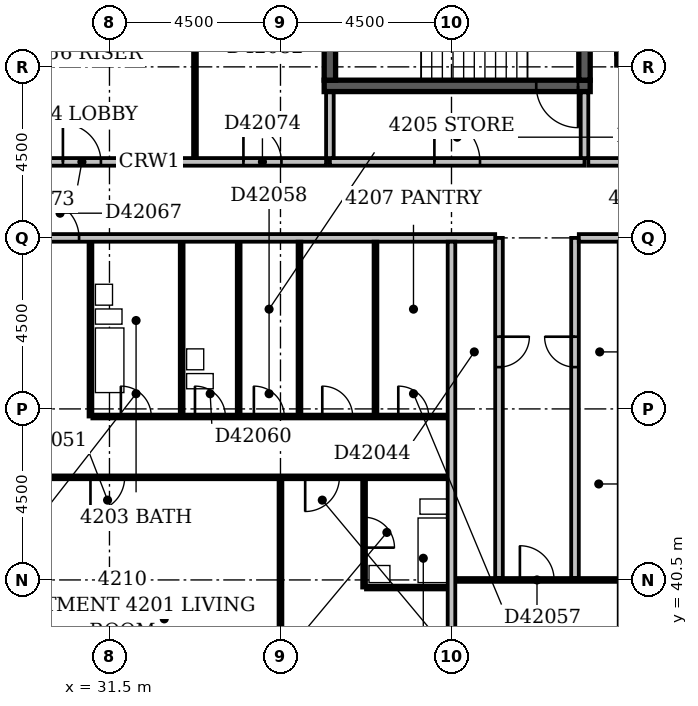
"""IFC4 building model, lengths in metres.
Left out: names, types, materials, properties, quantities, classifications, styles, units other than length and angle.
Written with IfcOpenShell. Run it as: python <this file> out.ifc"""

import sys

from ifc_helpers import new_model, si_unit, direction, frame, frame_2d, origin, place, context, subcontext, project, spatial, rectangle, extrude, element, fill, save


model = new_model("IFC4")
c1 = context("Model", 3, precision=1e-05, world=origin(), true_north=direction((0.0, 1.0)))
c2 = subcontext(c1, "Body", "Model", "MODEL_VIEW")
j1 = project(units=[si_unit("LENGTHUNIT", "METRE"), si_unit("PLANEANGLEUNIT", "RADIAN")], contexts=[c1])
p1 = place(None, origin())
s1 = spatial("IfcSite", under=j1, at=p1, CompositionType="ELEMENT")
p2 = place(p1, origin())
s2 = spatial("IfcBuilding", under=s1, at=p2, CompositionType="ELEMENT")
p3 = place(p2, frame((0.0, 0.0, 166.4)))
s3 = spatial("IfcBuildingStorey", under=s2, at=p3, CompositionType="ELEMENT", Elevation=166.4)
p4 = place(p3, frame((37.15, 53.5, -0.3), z_axis=(0.0, 0.0, 1.0), x_axis=(1.0, 0.0, 0.0)))
e1 = element("IfcWall", 1, at=p4, inside=s3, PredefinedType="SHEAR", context=c2, shape_type="SweptSolid", body=[
    extrude(rectangle(XDim=7.0, YDim=0.3, at=frame_2d((3.5, 0.0))), origin(), (0.0, 0.0, 1.0), 3.6),
])
p5 = place(p4, frame((5.58, 0.0, 0.3)))
e2 = element("IfcOpeningElement", 2, at=p5, cuts=e1, PredefinedType="OPENING", context=c2, shape_type="SweptSolid", body=[
    extrude(rectangle(XDim=1.1, YDim=2.1, at=frame_2d((0.55, 1.05))), frame((0.0, 0.162, 0.0), z_axis=(0.0, -1.0, 0.0), x_axis=(1.0, 0.0, 0.0)), (0.0, 0.0, 1.0), 0.324),
])
for number, where, z_axis, x_axis in (
    (3, (37.3, 53.65, -0.3), (0.0, 0.0, 1.0), (0.0, 1.0, 0.0)),
    (4, (44.0, 53.65, -0.3), (0.0, 0.0, 1.0), (0.0, 1.0, 0.0)),
):
    element("IfcWall", number, at=place(p3, frame(where, z_axis=z_axis, x_axis=x_axis)), inside=s3, PredefinedType="SHEAR", context=c2, shape_type="SweptSolid", body=[
        extrude(rectangle(XDim=4.2, YDim=0.3, at=frame_2d((2.1, 0.0))), origin(), (0.0, 0.0, 1.0), 3.6),
    ])
p6 = place(p3, frame((44.85, 54.2, -0.3), z_axis=(0.0, 0.0, 1.0), x_axis=(1.0, 0.0, 0.0)))
e5 = element("IfcWall", 5, at=p6, inside=s3, PredefinedType="SHEAR", context=c2, shape_type="SweptSolid", body=[
    extrude(rectangle(XDim=2.3, YDim=0.3, at=frame_2d((1.15, 0.0))), origin(), (0.0, 0.0, 1.0), 3.6),
])
p7 = place(p6, frame((0.65, 0.0, 0.3)))
e6 = element("IfcOpeningElement", 6, at=p7, cuts=e5, PredefinedType="OPENING", context=c2, shape_type="SweptSolid", body=[
    extrude(rectangle(XDim=1.0, YDim=2.1, at=frame_2d((0.5, 1.05))), frame((0.0, 0.162, 0.0), z_axis=(0.0, -1.0, 0.0), x_axis=(1.0, 0.0, 0.0)), (0.0, 0.0, 1.0), 0.324),
])
p8 = place(p3, frame((45.0, 54.35, -0.3), z_axis=(0.0, 0.0, 1.0), x_axis=(0.0, 1.0, 0.0)))
e7 = element("IfcWall", 7, at=p8, inside=s3, PredefinedType="SHEAR", context=c2, shape_type="SweptSolid", body=[
    extrude(rectangle(XDim=3.5, YDim=0.3, at=frame_2d((1.75, 0.0))), origin(), (0.0, 0.0, 1.0), 3.6),
])
p9 = place(p3, frame((37.3, 51.5, 0.0), z_axis=(0.0, 0.0, 1.0), x_axis=(1.0, 0.0, 0.0)))
e8 = element("IfcWall", 8, at=p9, inside=s3, PredefinedType="PARTITIONING", context=c2, shape_type="SweptSolid", body=[
    extrude(rectangle(XDim=6.7, YDim=0.2, at=frame_2d((3.35, 0.0))), origin(), (0.0, 0.0, 1.0), 3.3),
])
p10 = place(p9, frame((2.75, 0.0, 0.0)))
e9 = element("IfcOpeningElement", 9, at=p10, cuts=e8, PredefinedType="OPENING", context=c2, shape_type="SweptSolid", body=[
    extrude(rectangle(XDim=1.2, YDim=2.1, at=frame_2d((0.6, 1.05))), frame((0.0, 0.112, 0.0), z_axis=(0.0, -1.0, 0.0), x_axis=(1.0, 0.0, 0.0)), (0.0, 0.0, 1.0), 0.224),
])
for number, where, z_axis, x_axis in (
    (10, (44.0, 51.6, 0.0), (0.0, 0.0, 1.0), (0.0, 1.0, 0.0)),
    (11, (37.3, 51.6, 0.0), (0.0, 0.0, 1.0), (0.0, 1.0, 0.0)),
):
    element("IfcWall", number, at=place(p3, frame(where, z_axis=z_axis, x_axis=x_axis)), inside=s3, PredefinedType="PARTITIONING", context=c2, shape_type="SweptSolid", body=[
        extrude(rectangle(XDim=1.73, YDim=0.2, at=frame_2d((0.865, 0.0))), origin(), (0.0, 0.0, 1.0), 3.3),
    ])
p11 = place(p3, frame((36.0, 36.5, 0.0), z_axis=(0.0, 0.0, 1.0), x_axis=(0.0, 1.0, 0.0)))
e12 = element("IfcWall", 12, at=p11, inside=s3, PredefinedType="PARTITIONING", context=c2, shape_type="SweptSolid", body=[
    extrude(rectangle(XDim=6.65, YDim=0.1, at=frame_2d((3.325, 0.0))), origin(), (0.0, 0.0, 1.0), 2.4),
])
p12 = place(p3, frame((40.5, 36.5, 0.0), z_axis=(0.0, 0.0, 1.0), x_axis=(0.0, 1.0, 0.0)))
e13 = element("IfcWall", 13, at=p12, inside=s3, PredefinedType="PARTITIONING", context=c2, shape_type="SweptSolid", body=[
    extrude(rectangle(XDim=12.9, YDim=0.2, at=frame_2d((6.45, 0.0))), origin(), (0.0, 0.0, 1.0), 3.3),
])
p13 = place(p3, frame((38.2, 40.3, 0.0), z_axis=(0.0, 0.0, 1.0), x_axis=(0.0, 1.0, 0.0)))
e14 = element("IfcWall", 14, at=p13, inside=s3, PredefinedType="PLUMBINGWALL", context=c2, shape_type="SweptSolid", body=[
    extrude(rectangle(XDim=2.85, YDim=0.1, at=frame_2d((1.425, 0.0))), origin(), (0.0, 0.0, 1.0), 3.3),
])
p14 = place(p13, frame((1.05, 0.0, 0.0)))
e15 = element("IfcOpeningElement", 15, at=p14, cuts=e14, PredefinedType="OPENING", context=c2, shape_type="SweptSolid", body=[
    extrude(rectangle(XDim=0.8, YDim=2.1, at=frame_2d((0.4, 1.05))), frame((0.0, 0.062, 0.0), z_axis=(0.0, -1.0, 0.0), x_axis=(1.0, 0.0, 0.0)), (0.0, 0.0, 1.0), 0.124),
])
p15 = place(p3, frame((38.25, 40.3, 0.0), z_axis=(0.0, 0.0, 1.0), x_axis=(1.0, 0.0, 0.0)))
e16 = element("IfcWall", 16, at=p15, inside=s3, PredefinedType="PLUMBINGWALL", context=c2, shape_type="SweptSolid", body=[
    extrude(rectangle(XDim=2.15, YDim=0.1, at=frame_2d((1.075, 0.0))), origin(), (0.0, 0.0, 1.0), 3.3),
])
p16 = place(p3, frame((40.6, 40.5, 0.0), z_axis=(0.0, 0.0, 1.0), x_axis=(1.0, 0.0, 0.0)))
e17 = element("IfcWall", 17, at=p16, inside=s3, PredefinedType="PARTITIONING", context=c2, shape_type="SweptSolid", body=[
    extrude(rectangle(XDim=4.3, YDim=0.1, at=frame_2d((2.15, 0.0))), origin(), (0.0, 0.0, 1.0), 3.3),
])
p17 = place(p16, frame((1.7, 0.0, 0.0)))
e18 = element("IfcOpeningElement", 18, at=p17, cuts=e17, PredefinedType="OPENING", context=c2, shape_type="SweptSolid", body=[
    extrude(rectangle(XDim=0.9, YDim=2.1, at=frame_2d((0.45, 1.05))), frame((0.0, 0.062, 0.0), z_axis=(0.0, -1.0, 0.0), x_axis=(1.0, 0.0, 0.0)), (0.0, 0.0, 1.0), 0.124),
])
p18 = place(p3, frame((41.75, 40.55, 0.0), z_axis=(0.0, 0.0, 1.0), x_axis=(0.0, 1.0, 0.0)))
e19 = element("IfcWall", 19, at=p18, inside=s3, PredefinedType="PARTITIONING", context=c2, shape_type="SweptSolid", body=[
    extrude(rectangle(XDim=8.95, YDim=0.2, at=frame_2d((4.475, 0.0))), origin(), (0.0, 0.0, 1.0), 3.3),
])
p19 = place(p18, frame((5.55, 0.0, 0.0)))
e20 = element("IfcOpeningElement", 20, at=p19, cuts=e19, PredefinedType="OPENING", context=c2, shape_type="SweptSolid", body=[
    extrude(rectangle(XDim=0.8, YDim=2.1, at=frame_2d((0.4, 1.05))), frame((0.0, 0.112, 0.0), z_axis=(0.0, -1.0, 0.0), x_axis=(1.0, 0.0, 0.0)), (0.0, 0.0, 1.0), 0.224),
])
p20 = place(p3, frame((43.75, 40.55, 0.0), z_axis=(0.0, 0.0, 1.0), x_axis=(0.0, 1.0, 0.0)))
e21 = element("IfcWall", 21, at=p20, inside=s3, PredefinedType="PARTITIONING", context=c2, shape_type="SweptSolid", body=[
    extrude(rectangle(XDim=8.95, YDim=0.2, at=frame_2d((4.475, 0.0))), origin(), (0.0, 0.0, 1.0), 3.3),
])
p21 = place(p20, frame((5.55, 0.0, 0.0)))
e22 = element("IfcOpeningElement", 22, at=p21, cuts=e21, PredefinedType="OPENING", context=c2, shape_type="SweptSolid", body=[
    extrude(rectangle(XDim=0.8, YDim=2.1, at=frame_2d((0.4, 1.05))), frame((0.0, 0.112, 0.0), z_axis=(0.0, -1.0, 0.0), x_axis=(1.0, 0.0, 0.0)), (0.0, 0.0, 1.0), 0.224),
])
p22 = place(p3, frame((22.6, 43.2, 0.0), z_axis=(0.0, 0.0, 1.0), x_axis=(1.0, 0.0, 0.0)))
e23 = element("IfcWall", 23, at=p22, inside=s3, PredefinedType="PARTITIONING", context=c2, shape_type="SweptSolid", body=[
    extrude(rectangle(XDim=17.8, YDim=0.1, at=frame_2d((8.9, 0.0))), origin(), (0.0, 0.0, 1.0), 3.3),
])
p23 = place(p22, frame((2.85, 0.0, 0.0)))
e24 = element("IfcOpeningElement", 24, at=p23, cuts=e23, PredefinedType="OPENING", context=c2, shape_type="SweptSolid", body=[
    extrude(rectangle(XDim=0.9, YDim=2.1, at=frame_2d((0.45, 1.05))), frame((0.0, 0.062, 0.0), z_axis=(0.0, -1.0, 0.0), x_axis=(1.0, 0.0, 0.0)), (0.0, 0.0, 1.0), 0.124),
])
p24 = place(p22, frame((8.4, 0.0, 0.0)))
e25 = element("IfcOpeningElement", 25, at=p24, cuts=e23, PredefinedType="OPENING", context=c2, shape_type="SweptSolid", body=[
    extrude(rectangle(XDim=0.9, YDim=2.1, at=frame_2d((0.45, 1.05))), frame((0.0, 0.062, 0.0), z_axis=(0.0, -1.0, 0.0), x_axis=(1.0, 0.0, 0.0)), (0.0, 0.0, 1.0), 0.124),
])
p25 = place(p22, frame((14.05, 0.0, 0.0)))
e26 = element("IfcOpeningElement", 26, at=p25, cuts=e23, PredefinedType="OPENING", context=c2, shape_type="SweptSolid", body=[
    extrude(rectangle(XDim=0.9, YDim=2.1, at=frame_2d((0.45, 1.05))), frame((0.0, 0.062, 0.0), z_axis=(0.0, -1.0, 0.0), x_axis=(1.0, 0.0, 0.0)), (0.0, 0.0, 1.0), 0.124),
])
p26 = place(p3, frame((31.0, 44.8, 0.0), z_axis=(0.0, 0.0, 1.0), x_axis=(0.0, 1.0, 0.0)))
e27 = element("IfcWall", 27, at=p26, inside=s3, PredefinedType="PLUMBINGWALL", context=c2, shape_type="SweptSolid", body=[
    extrude(rectangle(XDim=4.6, YDim=0.1, at=frame_2d((2.3, 0.0))), origin(), (0.0, 0.0, 1.0), 3.3),
])
p27 = place(p3, frame((31.05, 44.8, 0.0), z_axis=(0.0, 0.0, 1.0), x_axis=(1.0, 0.0, 0.0)))
e28 = element("IfcWall", 28, at=p27, inside=s3, PredefinedType="PARTITIONING", context=c2, shape_type="SweptSolid", body=[
    extrude(rectangle(XDim=9.35, YDim=0.1, at=frame_2d((4.675, 0.0))), origin(), (0.0, 0.0, 1.0), 3.3),
])
p28 = place(p27, frame((0.75, 0.0, 0.0)))
e29 = element("IfcOpeningElement", 29, at=p28, cuts=e28, PredefinedType="OPENING", context=c2, shape_type="SweptSolid", body=[
    extrude(rectangle(XDim=0.8, YDim=2.1, at=frame_2d((0.4, 1.05))), frame((0.0, 0.062, 0.0), z_axis=(0.0, -1.0, 0.0), x_axis=(1.0, 0.0, 0.0)), (0.0, 0.0, 1.0), 0.124),
])
p29 = place(p27, frame((8.05, 0.0, 0.0)))
e30 = element("IfcOpeningElement", 30, at=p29, cuts=e28, PredefinedType="OPENING", context=c2, shape_type="SweptSolid", body=[
    extrude(rectangle(XDim=0.8, YDim=2.1, at=frame_2d((0.4, 1.05))), frame((0.0, 0.062, 0.0), z_axis=(0.0, -1.0, 0.0), x_axis=(1.0, 0.0, 0.0)), (0.0, 0.0, 1.0), 0.124),
])
p30 = place(p27, frame((4.25, 0.0, 0.0)))
e31 = element("IfcOpeningElement", 31, at=p30, cuts=e28, PredefinedType="OPENING", context=c2, shape_type="SweptSolid", body=[
    extrude(rectangle(XDim=0.8, YDim=2.1, at=frame_2d((0.4, 1.05))), frame((0.0, 0.062, 0.0), z_axis=(0.0, -1.0, 0.0), x_axis=(1.0, 0.0, 0.0)), (0.0, 0.0, 1.0), 0.124),
])
p31 = place(p27, frame((6.05, 0.0, 0.0)))
e32 = element("IfcOpeningElement", 32, at=p31, cuts=e28, PredefinedType="OPENING", context=c2, shape_type="SweptSolid", body=[
    extrude(rectangle(XDim=0.8, YDim=2.1, at=frame_2d((0.4, 1.05))), frame((0.0, 0.062, 0.0), z_axis=(0.0, -1.0, 0.0), x_axis=(1.0, 0.0, 0.0)), (0.0, 0.0, 1.0), 0.124),
])
p32 = place(p27, frame((2.7, 0.0, 0.0)))
e33 = element("IfcOpeningElement", 33, at=p32, cuts=e28, PredefinedType="OPENING", context=c2, shape_type="SweptSolid", body=[
    extrude(rectangle(XDim=0.8, YDim=2.1, at=frame_2d((0.4, 1.05))), frame((0.0, 0.062, 0.0), z_axis=(0.0, -1.0, 0.0), x_axis=(1.0, 0.0, 0.0)), (0.0, 0.0, 1.0), 0.124),
])
for number, where, z_axis, x_axis in (
    (34, (33.4, 44.85, 0.0), (0.0, 0.0, 1.0), (0.0, 1.0, 0.0)),
    (35, (34.9, 44.85, 0.0), (0.0, 0.0, 1.0), (0.0, 1.0, 0.0)),
):
    element("IfcWall", number, at=place(p3, frame(where, z_axis=z_axis, x_axis=x_axis)), inside=s3, PredefinedType="PLUMBINGWALL", context=c2, shape_type="SweptSolid", body=[
        extrude(rectangle(XDim=4.55, YDim=0.1, at=frame_2d((2.275, 0.0))), origin(), (0.0, 0.0, 1.0), 3.3),
    ])
p33 = place(p3, frame((36.5, 44.85, 0.0), z_axis=(0.0, 0.0, 1.0), x_axis=(0.0, 1.0, 0.0)))
e36 = element("IfcWall", 36, at=p33, inside=s3, PredefinedType="PARTITIONING", context=c2, shape_type="SweptSolid", body=[
    extrude(rectangle(XDim=4.55, YDim=0.1, at=frame_2d((2.275, 0.0))), origin(), (0.0, 0.0, 1.0), 2.4),
])
p34 = place(p3, frame((38.5, 44.85, 0.0), z_axis=(0.0, 0.0, 1.0), x_axis=(0.0, 1.0, 0.0)))
e37 = element("IfcWall", 37, at=p34, inside=s3, PredefinedType="PARTITIONING", context=c2, shape_type="SweptSolid", body=[
    extrude(rectangle(XDim=4.55, YDim=0.1, at=frame_2d((2.275, 0.0))), origin(), (0.0, 0.0, 1.0), 3.3),
])
p35 = place(p3, frame((9.1, 49.5, 0.0), z_axis=(0.0, 0.0, 1.0), x_axis=(1.0, 0.0, 0.0)))
e38 = element("IfcWall", 38, at=p35, inside=s3, PredefinedType="PARTITIONING", context=c2, shape_type="SweptSolid", body=[
    extrude(rectangle(XDim=32.55, YDim=0.2, at=frame_2d((16.275, 0.0))), origin(), (0.0, 0.0, 1.0), 3.3),
])
p36 = place(p35, frame((20.6, 0.0, 0.0)))
e39 = element("IfcOpeningElement", 39, at=p36, cuts=e38, PredefinedType="OPENING", context=c2, shape_type="SweptSolid", body=[
    extrude(rectangle(XDim=1.0, YDim=2.1, at=frame_2d((0.5, 1.05))), frame((0.0, 0.112, 0.0), z_axis=(0.0, -1.0, 0.0), x_axis=(1.0, 0.0, 0.0)), (0.0, 0.0, 1.0), 0.224),
])
p37 = place(p35, frame((6.15, 0.0, 0.0)))
e40 = element("IfcOpeningElement", 40, at=p37, cuts=e38, PredefinedType="OPENING", context=c2, shape_type="SweptSolid", body=[
    extrude(rectangle(XDim=0.9, YDim=2.1, at=frame_2d((0.45, 1.05))), frame((0.0, 0.112, 0.0), z_axis=(0.0, -1.0, 0.0), x_axis=(1.0, 0.0, 0.0)), (0.0, 0.0, 1.0), 0.224),
])
p38 = place(p3, frame((43.85, 49.5, 0.0), z_axis=(0.0, 0.0, 1.0), x_axis=(1.0, 0.0, 0.0)))
e41 = element("IfcWall", 41, at=p38, inside=s3, PredefinedType="PARTITIONING", context=c2, shape_type="SweptSolid", body=[
    extrude(rectangle(XDim=11.3, YDim=0.2, at=frame_2d((5.65, 0.0))), origin(), (0.0, 0.0, 1.0), 3.3),
])
p39 = place(p38, frame((1.45, 0.0, 0.0)))
e42 = element("IfcOpeningElement", 42, at=p39, cuts=e41, PredefinedType="OPENING", context=c2, shape_type="SweptSolid", body=[
    extrude(rectangle(XDim=1.0, YDim=2.1, at=frame_2d((0.5, 1.05))), frame((0.0, 0.112, 0.0), z_axis=(0.0, -1.0, 0.0), x_axis=(1.0, 0.0, 0.0)), (0.0, 0.0, 1.0), 0.224),
])
p40 = place(p3, frame((27.9, 51.5, 0.0), z_axis=(0.0, 0.0, 1.0), x_axis=(1.0, 0.0, 0.0)))
e43 = element("IfcWall", 43, at=p40, inside=s3, PredefinedType="PARTITIONING", context=c2, shape_type="SweptSolid", body=[
    extrude(rectangle(XDim=9.3, YDim=0.2, at=frame_2d((4.65, 0.0))), origin(), (0.0, 0.0, 1.0), 3.3),
])
p41 = place(p40, frame((2.375, 0.0, 0.0)))
e44 = element("IfcOpeningElement", 44, at=p41, cuts=e43, PredefinedType="OPENING", context=c2, shape_type="SweptSolid", body=[
    extrude(rectangle(XDim=1.0, YDim=2.1, at=frame_2d((0.5, 1.05))), frame((0.0, 0.112, 0.0), z_axis=(0.0, -1.0, 0.0), x_axis=(1.0, 0.0, 0.0)), (0.0, 0.0, 1.0), 0.224),
])
p42 = place(p40, frame((7.125, 0.0, 0.0)))
e45 = element("IfcOpeningElement", 45, at=p42, cuts=e43, PredefinedType="OPENING", context=c2, shape_type="SweptSolid", body=[
    extrude(rectangle(XDim=1.0, YDim=2.1, at=frame_2d((0.5, 1.05))), frame((0.0, 0.112, 0.0), z_axis=(0.0, -1.0, 0.0), x_axis=(1.0, 0.0, 0.0)), (0.0, 0.0, 1.0), 0.224),
])
p43 = place(p3, frame((44.1, 51.5, 0.0), z_axis=(0.0, 0.0, 1.0), x_axis=(1.0, 0.0, 0.0)))
e46 = element("IfcWall", 46, at=p43, inside=s3, PredefinedType="PARTITIONING", context=c2, shape_type="SweptSolid", body=[
    extrude(rectangle(XDim=9.8, YDim=0.2, at=frame_2d((4.9, 0.0))), origin(), (0.0, 0.0, 1.0), 3.3),
])
p44 = place(p43, frame((2.775, 0.0, 0.0)))
e47 = element("IfcOpeningElement", 47, at=p44, cuts=e46, PredefinedType="OPENING", context=c2, shape_type="SweptSolid", body=[
    extrude(rectangle(XDim=0.9, YDim=2.1, at=frame_2d((0.45, 1.05))), frame((0.0, 0.112, 0.0), z_axis=(0.0, -1.0, 0.0), x_axis=(1.0, 0.0, 0.0)), (0.0, 0.0, 1.0), 0.224),
])
p45 = place(p43, frame((7.725, 0.0, 0.0)))
e48 = element("IfcOpeningElement", 48, at=p45, cuts=e46, PredefinedType="OPENING", context=c2, shape_type="SweptSolid", body=[
    extrude(rectangle(XDim=1.0, YDim=2.1, at=frame_2d((0.5, 1.05))), frame((0.0, 0.112, 0.0), z_axis=(0.0, -1.0, 0.0), x_axis=(1.0, 0.0, 0.0)), (0.0, 0.0, 1.0), 0.224),
])
p46 = place(p3, frame((33.75, 51.6, 0.0), z_axis=(0.0, 0.0, 1.0), x_axis=(0.0, 1.0, 0.0)))
e49 = element("IfcWall", 49, at=p46, inside=s3, PredefinedType="PARTITIONING", context=c2, shape_type="SweptSolid", body=[
    extrude(rectangle(XDim=3.8, YDim=0.1, at=frame_2d((1.9, 0.0))), origin(), (0.0, 0.0, 1.0), 3.3),
])
p47 = place(p10, origin())
e50 = element("IfcDoor", 50, at=p47, inside=s3, OperationType="SINGLE_SWING_LEFT", PredefinedType="DOOR", context=c2, shape_type="SweptSolid", body=[
    extrude(rectangle(XDim=1.2, YDim=2.1, at=frame_2d((0.6, 1.05))), frame((0.0, 0.025, 0.0), z_axis=(0.0, -1.0, 0.0), x_axis=(1.0, 0.0, 0.0)), (0.0, 0.0, 1.0), 0.05),
])
fill(e9, e50)
p48 = place(p5, origin())
e51 = element("IfcDoor", 51, at=p48, inside=s3, OperationType="SINGLE_SWING_RIGHT", PredefinedType="DOOR", context=c2, shape_type="SweptSolid", body=[
    extrude(rectangle(XDim=1.1, YDim=2.1, at=frame_2d((0.55, 1.05))), frame((0.0, 0.025, 0.0), z_axis=(0.0, -1.0, 0.0), x_axis=(1.0, 0.0, 0.0)), (0.0, 0.0, 1.0), 0.05),
])
fill(e2, e51)
p49 = place(p14, frame((0.8, 0.0, 0.0), z_axis=(0.0, 0.0, 1.0), x_axis=(-1.0, 0.0, 0.0)))
e52 = element("IfcDoor", 52, at=p49, inside=s3, OperationType="SINGLE_SWING_RIGHT", PredefinedType="DOOR", context=c2, shape_type="SweptSolid", body=[
    extrude(rectangle(XDim=0.8, YDim=2.1, at=frame_2d((0.4, 1.05))), frame((0.0, 0.025, 0.0), z_axis=(0.0, -1.0, 0.0), x_axis=(1.0, 0.0, 0.0)), (0.0, 0.0, 1.0), 0.05),
])
fill(e15, e52)
p50 = place(p17, origin())
e53 = element("IfcDoor", 53, at=p50, inside=s3, OperationType="SINGLE_SWING_LEFT", PredefinedType="DOOR", context=c2, shape_type="SweptSolid", body=[
    extrude(rectangle(XDim=0.9, YDim=2.1, at=frame_2d((0.45, 1.05))), frame((0.0, 0.025, 0.0), z_axis=(0.0, -1.0, 0.0), x_axis=(1.0, 0.0, 0.0)), (0.0, 0.0, 1.0), 0.05),
])
fill(e18, e53)
p51 = place(p19, origin())
e54 = element("IfcDoor", 54, at=p51, inside=s3, OperationType="SINGLE_SWING_RIGHT", PredefinedType="DOOR", context=c2, shape_type="SweptSolid", body=[
    extrude(rectangle(XDim=0.8, YDim=2.1, at=frame_2d((0.4, 1.05))), frame((0.0, 0.025, 0.0), z_axis=(0.0, -1.0, 0.0), x_axis=(1.0, 0.0, 0.0)), (0.0, 0.0, 1.0), 0.05),
])
fill(e20, e54)
p52 = place(p21, frame((0.8, 0.0, 0.0), z_axis=(0.0, 0.0, 1.0), x_axis=(-1.0, 0.0, 0.0)))
e55 = element("IfcDoor", 55, at=p52, inside=s3, OperationType="SINGLE_SWING_LEFT", PredefinedType="DOOR", context=c2, shape_type="SweptSolid", body=[
    extrude(rectangle(XDim=0.8, YDim=2.1, at=frame_2d((0.4, 1.05))), frame((0.0, 0.025, 0.0), z_axis=(0.0, -1.0, 0.0), x_axis=(1.0, 0.0, 0.0)), (0.0, 0.0, 1.0), 0.05),
])
fill(e22, e55)
p53 = place(p24, frame((0.9, 0.0, 0.0), z_axis=(0.0, 0.0, 1.0), x_axis=(-1.0, 0.0, 0.0)))
e56 = element("IfcDoor", 56, at=p53, inside=s3, OperationType="SINGLE_SWING_RIGHT", PredefinedType="DOOR", context=c2, shape_type="SweptSolid", body=[
    extrude(rectangle(XDim=0.9, YDim=2.1, at=frame_2d((0.45, 1.05))), frame((0.0, 0.025, 0.0), z_axis=(0.0, -1.0, 0.0), x_axis=(1.0, 0.0, 0.0)), (0.0, 0.0, 1.0), 0.05),
])
fill(e25, e56)
p54 = place(p25, frame((0.9, 0.0, 0.0), z_axis=(0.0, 0.0, 1.0), x_axis=(-1.0, 0.0, 0.0)))
e57 = element("IfcDoor", 57, at=p54, inside=s3, OperationType="SINGLE_SWING_RIGHT", PredefinedType="DOOR", context=c2, shape_type="SweptSolid", body=[
    extrude(rectangle(XDim=0.9, YDim=2.1, at=frame_2d((0.45, 1.05))), frame((0.0, 0.025, 0.0), z_axis=(0.0, -1.0, 0.0), x_axis=(1.0, 0.0, 0.0)), (0.0, 0.0, 1.0), 0.05),
])
fill(e26, e57)
p55 = place(p28, origin())
e58 = element("IfcDoor", 58, at=p55, inside=s3, OperationType="SINGLE_SWING_LEFT", PredefinedType="DOOR", context=c2, shape_type="SweptSolid", body=[
    extrude(rectangle(XDim=0.8, YDim=2.1, at=frame_2d((0.4, 1.05))), frame((0.0, 0.025, 0.0), z_axis=(0.0, -1.0, 0.0), x_axis=(1.0, 0.0, 0.0)), (0.0, 0.0, 1.0), 0.05),
])
fill(e29, e58)
p56 = place(p29, origin())
e59 = element("IfcDoor", 59, at=p56, inside=s3, OperationType="SINGLE_SWING_LEFT", PredefinedType="DOOR", context=c2, shape_type="SweptSolid", body=[
    extrude(rectangle(XDim=0.8, YDim=2.1, at=frame_2d((0.4, 1.05))), frame((0.0, 0.025, 0.0), z_axis=(0.0, -1.0, 0.0), x_axis=(1.0, 0.0, 0.0)), (0.0, 0.0, 1.0), 0.05),
])
fill(e30, e59)
p57 = place(p30, origin())
e60 = element("IfcDoor", 60, at=p57, inside=s3, OperationType="SINGLE_SWING_LEFT", PredefinedType="DOOR", context=c2, shape_type="SweptSolid", body=[
    extrude(rectangle(XDim=0.8, YDim=2.1, at=frame_2d((0.4, 1.05))), frame((0.0, 0.025, 0.0), z_axis=(0.0, -1.0, 0.0), x_axis=(1.0, 0.0, 0.0)), (0.0, 0.0, 1.0), 0.05),
])
fill(e31, e60)
p58 = place(p31, origin())
e61 = element("IfcDoor", 61, at=p58, inside=s3, OperationType="SINGLE_SWING_LEFT", PredefinedType="DOOR", context=c2, shape_type="SweptSolid", body=[
    extrude(rectangle(XDim=0.8, YDim=2.1, at=frame_2d((0.4, 1.05))), frame((0.0, 0.025, 0.0), z_axis=(0.0, -1.0, 0.0), x_axis=(1.0, 0.0, 0.0)), (0.0, 0.0, 1.0), 0.05),
])
fill(e32, e61)
p59 = place(p32, origin())
e62 = element("IfcDoor", 62, at=p59, inside=s3, OperationType="SINGLE_SWING_LEFT", PredefinedType="DOOR", context=c2, shape_type="SweptSolid", body=[
    extrude(rectangle(XDim=0.8, YDim=2.1, at=frame_2d((0.4, 1.05))), frame((0.0, 0.025, 0.0), z_axis=(0.0, -1.0, 0.0), x_axis=(1.0, 0.0, 0.0)), (0.0, 0.0, 1.0), 0.05),
])
fill(e33, e62)
p60 = place(p36, origin())
e63 = element("IfcDoor", 63, at=p60, inside=s3, OperationType="SINGLE_SWING_LEFT", PredefinedType="DOOR", context=c2, shape_type="SweptSolid", body=[
    extrude(rectangle(XDim=1.0, YDim=2.1, at=frame_2d((0.5, 1.05))), frame((0.0, 0.025, 0.0), z_axis=(0.0, -1.0, 0.0), x_axis=(1.0, 0.0, 0.0)), (0.0, 0.0, 1.0), 0.05),
])
fill(e39, e63)
p61 = place(p41, origin())
e64 = element("IfcDoor", 64, at=p61, inside=s3, OperationType="SINGLE_SWING_LEFT", PredefinedType="DOOR", context=c2, shape_type="SweptSolid", body=[
    extrude(rectangle(XDim=1.0, YDim=2.1, at=frame_2d((0.5, 1.05))), frame((0.0, 0.025, 0.0), z_axis=(0.0, -1.0, 0.0), x_axis=(1.0, 0.0, 0.0)), (0.0, 0.0, 1.0), 0.05),
])
fill(e44, e64)
p62 = place(p42, origin())
e65 = element("IfcDoor", 65, at=p62, inside=s3, OperationType="SINGLE_SWING_LEFT", PredefinedType="DOOR", context=c2, shape_type="SweptSolid", body=[
    extrude(rectangle(XDim=1.0, YDim=2.1, at=frame_2d((0.5, 1.05))), frame((0.0, 0.025, 0.0), z_axis=(0.0, -1.0, 0.0), x_axis=(1.0, 0.0, 0.0)), (0.0, 0.0, 1.0), 0.05),
])
fill(e45, e65)
save(model, sys.argv[1])
